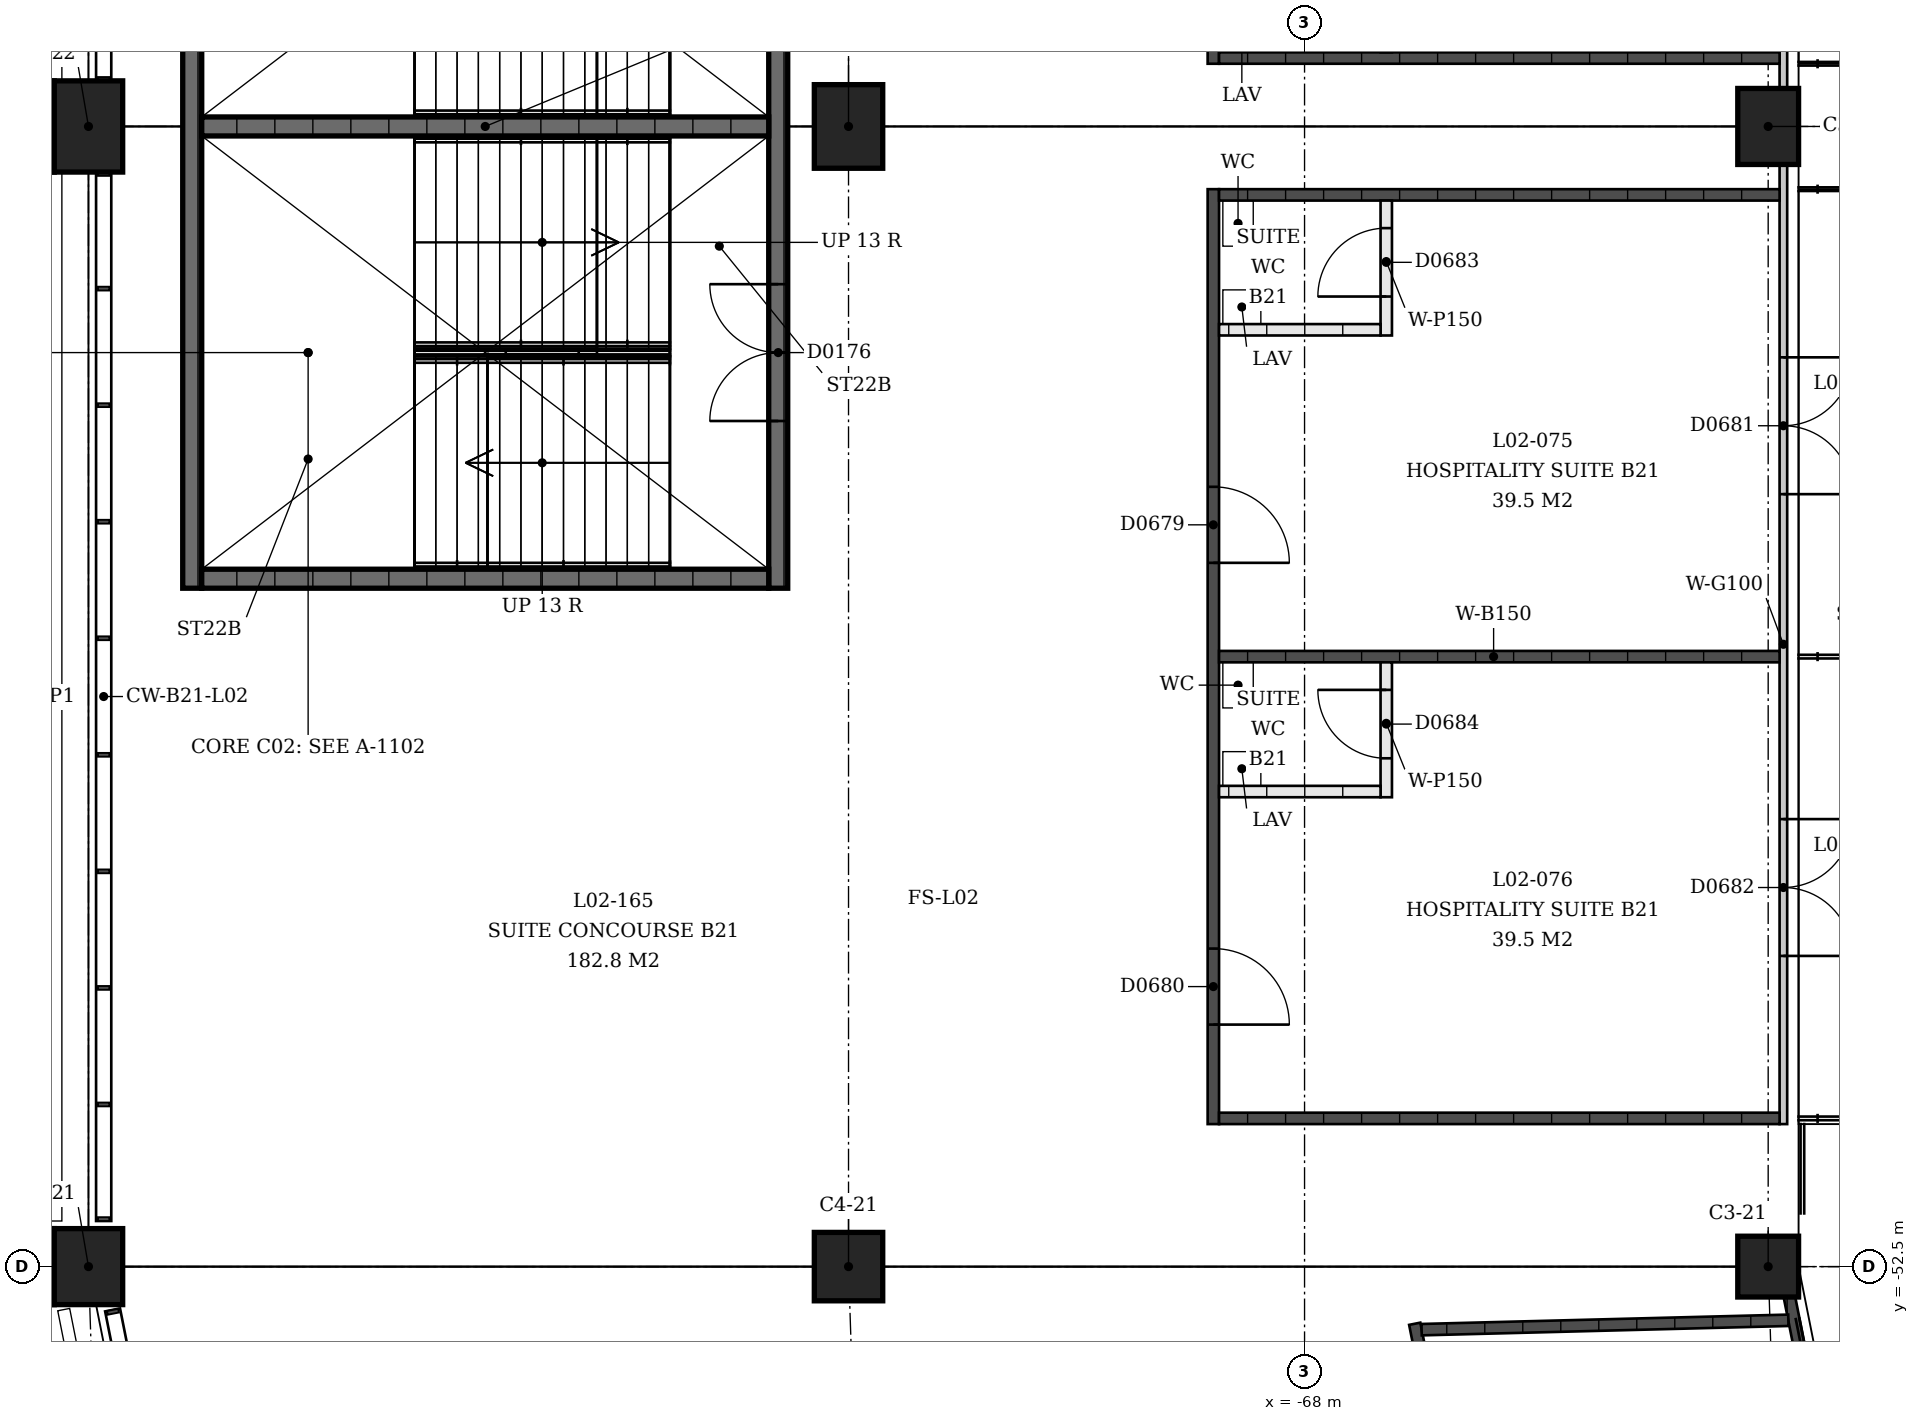
"""IFC4 building model, lengths in metres.
Left out: names, types, materials, properties, quantities, classifications, styles, units other than length and angle.
Written with IfcOpenShell. Run it as: python <this file> out.ifc"""

import sys

from ifc_helpers import new_model, si_unit, direction, frame, frame_2d, origin, origin_2d, place, context, subcontext, project, spatial, rectangle, extrude, element, fill, save


model = new_model("IFC4")
c1 = context("Model", 3, precision=1e-05, world=origin(), true_north=direction((0.0, 1.0)))
c2 = subcontext(c1, "Body", "Model", "MODEL_VIEW")
j1 = project(units=[si_unit("LENGTHUNIT", "METRE"), si_unit("PLANEANGLEUNIT", "RADIAN")], contexts=[c1])
p1 = place(None, origin())
s1 = spatial("IfcSite", under=j1, at=p1, CompositionType="ELEMENT")
p2 = place(p1, origin())
s2 = spatial("IfcBuilding", under=s1, at=p2, CompositionType="ELEMENT")
p3 = place(p2, frame((0.0, 0.0, 9.0)))
s3 = spatial("IfcBuildingStorey", under=s2, at=p3, CompositionType="ELEMENT", Elevation=9.0)
p4 = place(p3, frame((-61.9, -52.5, 0.0), z_axis=(0.0, 0.0, 1.0), x_axis=(0.0, -1.0, 0.0)))
e1 = element("IfcColumn", 1, at=p4, inside=s3, PredefinedType="COLUMN", context=c2, shape_type="SweptSolid", body=[
    extrude(rectangle(XDim=0.8, YDim=0.8, at=origin_2d()), origin(), (0.0, 0.0, 1.0), 4.5),
])
p5 = place(p3, frame((-74.0, -52.5, 0.0), z_axis=(0.0, 0.0, 1.0), x_axis=(0.0, -1.0, 0.0)))
e2 = element("IfcColumn", 2, at=p5, inside=s3, PredefinedType="COLUMN", context=c2, shape_type="SweptSolid", body=[
    extrude(rectangle(XDim=0.9, YDim=0.9, at=origin_2d()), origin(), (0.0, 0.0, 1.0), 4.5),
])
p6 = place(p3, frame((-84.0, -52.5, 0.0), z_axis=(0.0, 0.0, 1.0), x_axis=(0.0, -1.0, 0.0)))
e3 = element("IfcColumn", 3, at=p6, inside=s3, PredefinedType="COLUMN", context=c2, shape_type="SweptSolid", body=[
    extrude(rectangle(XDim=1.0, YDim=0.9, at=origin_2d()), origin(), (0.0, 0.0, 1.0), 4.5),
])
p7 = place(p3, frame((-61.9, -37.5, 0.0), z_axis=(0.0, 0.0, 1.0), x_axis=(0.0, -1.0, 0.0)))
e4 = element("IfcColumn", 4, at=p7, inside=s3, PredefinedType="COLUMN", context=c2, shape_type="SweptSolid", body=[
    extrude(rectangle(XDim=1.0, YDim=0.8, at=origin_2d()), origin(), (0.0, 0.0, 1.0), 4.5),
])
p8 = place(p3, frame((-74.0, -37.5, 0.0), z_axis=(0.0, 0.0, 1.0), x_axis=(0.0, -1.0, 0.0)))
e5 = element("IfcColumn", 5, at=p8, inside=s3, PredefinedType="COLUMN", context=c2, shape_type="SweptSolid", body=[
    extrude(rectangle(XDim=1.1, YDim=0.9, at=origin_2d()), origin(), (0.0, 0.0, 1.0), 4.5),
])
p9 = place(p3, frame((-84.0, -37.5, 0.0), z_axis=(0.0, 0.0, 1.0), x_axis=(0.0, -1.0, 0.0)))
e6 = element("IfcColumn", 6, at=p9, inside=s3, PredefinedType="COLUMN", context=c2, shape_type="SweptSolid", body=[
    extrude(rectangle(XDim=1.2, YDim=0.9, at=origin_2d()), origin(), (0.0, 0.0, 1.0), 4.5),
])
p10 = place(p3, frame((-74.925, -31.425, 0.0), z_axis=(0.0, 0.0, 1.0), x_axis=(0.0, -1.0, 0.0)))
e7 = element("IfcWall", 7, at=p10, inside=s3, PredefinedType="SHEAR", context=c2, shape_type="SweptSolid", body=[
    extrude(rectangle(XDim=12.15, YDim=0.25, at=frame_2d((6.075, 0.0))), origin(), (0.0, 0.0, 1.0), 4.09),
])
p11 = place(p10, frame((2.2, 0.0, 0.0)))
e8 = element("IfcOpeningElement", 8, at=p11, cuts=e7, PredefinedType="OPENING", context=c2, shape_type="SweptSolid", body=[
    extrude(rectangle(XDim=1.8, YDim=2.1, at=frame_2d((0.9, 1.05))), frame((0.0, 0.125, 0.0), z_axis=(0.0, -1.0, 0.0), x_axis=(1.0, 0.0, 0.0)), (0.0, 0.0, 1.0), 0.25),
])
p12 = place(p10, frame((8.15, 0.0, 0.0)))
e9 = element("IfcOpeningElement", 9, at=p12, cuts=e7, PredefinedType="OPENING", context=c2, shape_type="SweptSolid", body=[
    extrude(rectangle(XDim=1.8, YDim=2.1, at=frame_2d((0.9, 1.05))), frame((0.0, 0.125, 0.0), z_axis=(0.0, -1.0, 0.0), x_axis=(1.0, 0.0, 0.0)), (0.0, 0.0, 1.0), 0.25),
])
p13 = place(p3, frame((-82.635, -31.425, 0.0), z_axis=(0.0, 0.0, 1.0), x_axis=(0.0, -1.0, 0.0)))
e10 = element("IfcWall", 10, at=p13, inside=s3, PredefinedType="SHEAR", context=c2, shape_type="SweptSolid", body=[
    extrude(rectangle(XDim=12.15, YDim=0.25, at=frame_2d((6.075, 0.0))), origin(), (0.0, 0.0, 1.0), 4.09),
])
for number, where, z_axis, x_axis in (
    (11, (-75.05, -43.45, 0.0), (0.0, 0.0, 1.0), (-1.0, 0.0, 0.0)),
    (12, (-75.05, -37.5, 0.0), (0.0, 0.0, 1.0), (-1.0, 0.0, 0.0)),
):
    element("IfcWall", number, at=place(p3, frame(where, z_axis=z_axis, x_axis=x_axis)), inside=s3, PredefinedType="SHEAR", context=c2, shape_type="SweptSolid", body=[
        extrude(rectangle(XDim=7.46, YDim=0.25, at=frame_2d((3.73, 0.0))), origin(), (0.0, 0.0, 1.0), 4.09),
    ])
p14 = place(p3, frame((-59.681, -62.65, 0.0), z_axis=(0.0, 0.0, 1.0), x_axis=(-0.195086492048, 0.980786042223, 0.0)))
e13 = element("IfcWall", 13, at=p14, inside=s3, PredefinedType="SOLIDWALL", context=c2, shape_type="SweptSolid", body=[
    extrude(rectangle(XDim=9.941, YDim=0.15, at=frame_2d((4.971, 0.0))), origin(), (0.0, 0.0, 1.0), 3.0),
])
p15 = place(p3, frame((-64.385, -64.138, 0.0), z_axis=(0.0, 0.0, 1.0), x_axis=(-0.195083899224, 0.980786557954, 0.0)))
e14 = element("IfcWall", 14, at=p15, inside=s3, PredefinedType="SOLIDWALL", context=c2, shape_type="SweptSolid", body=[
    extrude(rectangle(XDim=11.099, YDim=0.15, at=frame_2d((5.55, 0.0))), origin(), (0.0, 0.0, 1.0), 3.0),
])
p16 = place(p15, frame((2.315, 0.0, 0.0)))
e15 = element("IfcOpeningElement", 15, at=p16, cuts=e14, PredefinedType="OPENING", context=c2, shape_type="SweptSolid", body=[
    extrude(rectangle(XDim=1.0, YDim=2.1, at=frame_2d((0.5, 1.05))), frame((0.0, 0.075, 0.0), z_axis=(0.0, -1.0, 0.0), x_axis=(1.0, 0.0, 0.0)), (0.0, 0.0, 1.0), 0.15),
])
p17 = place(p15, frame((7.784, 0.0, 0.0)))
e16 = element("IfcOpeningElement", 16, at=p17, cuts=e14, PredefinedType="OPENING", context=c2, shape_type="SweptSolid", body=[
    extrude(rectangle(XDim=1.0, YDim=2.1, at=frame_2d((0.5, 1.05))), frame((0.0, 0.075, 0.0), z_axis=(0.0, -1.0, 0.0), x_axis=(1.0, 0.0, 0.0)), (0.0, 0.0, 1.0), 0.15),
])
p18 = place(p3, frame((-61.635, -53.206, 0.0), z_axis=(0.0, 0.0, 1.0), x_axis=(-0.999673752981, -0.025541879345, 0.0)))
e17 = element("IfcWall", 17, at=p18, inside=s3, PredefinedType="SOLIDWALL", context=c2, shape_type="SweptSolid", body=[
    extrude(rectangle(XDim=4.827, YDim=0.15, at=frame_2d((2.414, 0.0))), origin(), (0.0, 0.0, 1.0), 3.0),
])
p19 = place(p3, frame((-61.7, -38.0, 0.0), z_axis=(0.0, 0.0, 1.0), x_axis=(0.0, -1.0, 0.0)))
e18 = element("IfcWall", 18, at=p19, inside=s3, PredefinedType="PARTITIONING", context=c2, shape_type="SweptSolid", body=[
    extrude(rectangle(XDim=12.625, YDim=0.1, at=frame_2d((6.312, 0.0))), origin(), (0.0, 0.0, 1.0), 3.0),
])
p20 = place(p19, frame((2.538, 0.0, 0.0)))
e19 = element("IfcOpeningElement", 19, at=p20, cuts=e18, PredefinedType="OPENING", context=c2, shape_type="SweptSolid", body=[
    extrude(rectangle(XDim=1.8, YDim=2.1, at=frame_2d((0.9, 1.05))), frame((0.0, 0.05, 0.0), z_axis=(0.0, -1.0, 0.0), x_axis=(1.0, 0.0, 0.0)), (0.0, 0.0, 1.0), 0.1),
])
p21 = place(p19, frame((8.613, 0.0, 0.0)))
e20 = element("IfcOpeningElement", 20, at=p21, cuts=e18, PredefinedType="OPENING", context=c2, shape_type="SweptSolid", body=[
    extrude(rectangle(XDim=1.8, YDim=2.1, at=frame_2d((0.9, 1.05))), frame((0.0, 0.05, 0.0), z_axis=(0.0, -1.0, 0.0), x_axis=(1.0, 0.0, 0.0)), (0.0, 0.0, 1.0), 0.1),
])
p22 = place(p3, frame((-69.2, -38.325, 0.0), z_axis=(0.0, 0.0, 1.0), x_axis=(0.0, -1.0, 0.0)))
e21 = element("IfcWall", 21, at=p22, inside=s3, PredefinedType="SOLIDWALL", context=c2, shape_type="SweptSolid", body=[
    extrude(rectangle(XDim=12.3, YDim=0.15, at=frame_2d((6.15, 0.0))), origin(), (0.0, 0.0, 1.0), 3.0),
])
p23 = place(p22, frame((3.916, 0.0, 0.0)))
e22 = element("IfcOpeningElement", 22, at=p23, cuts=e21, PredefinedType="OPENING", context=c2, shape_type="SweptSolid", body=[
    extrude(rectangle(XDim=1.0, YDim=2.1, at=frame_2d((0.5, 1.05))), frame((0.0, 0.075, 0.0), z_axis=(0.0, -1.0, 0.0), x_axis=(1.0, 0.0, 0.0)), (0.0, 0.0, 1.0), 0.15),
])
p24 = place(p22, frame((9.991, 0.0, 0.0)))
e23 = element("IfcOpeningElement", 23, at=p24, cuts=e21, PredefinedType="OPENING", context=c2, shape_type="SweptSolid", body=[
    extrude(rectangle(XDim=1.0, YDim=2.1, at=frame_2d((0.5, 1.05))), frame((0.0, 0.075, 0.0), z_axis=(0.0, -1.0, 0.0), x_axis=(1.0, 0.0, 0.0)), (0.0, 0.0, 1.0), 0.15),
])
for number, where, z_axis, x_axis in (
    (24, (-61.75, -38.4, 0.0), (0.0, 0.0, 1.0), (-1.0, 0.0, 0.0)),
    (25, (-61.75, -44.475, 0.0), (0.0, 0.0, 1.0), (-1.0, 0.0, 0.0)),
    (26, (-61.75, -50.55, 0.0), (0.0, 0.0, 1.0), (-1.0, 0.0, 0.0)),
):
    element("IfcWall", number, at=place(p3, frame(where, z_axis=z_axis, x_axis=x_axis)), inside=s3, PredefinedType="SOLIDWALL", context=c2, shape_type="SweptSolid", body=[
        extrude(rectangle(XDim=7.375, YDim=0.15, at=frame_2d((3.688, 0.0))), origin(), (0.0, 0.0, 1.0), 3.0),
    ])
p25 = place(p3, frame((-66.925, -38.475, 0.0), z_axis=(0.0, 0.0, 1.0), x_axis=(0.0, -1.0, 0.0)))
e27 = element("IfcWall", 27, at=p25, inside=s3, PredefinedType="PARTITIONING", context=c2, shape_type="SweptSolid", body=[
    extrude(rectangle(XDim=1.775, YDim=0.15, at=frame_2d((0.887, 0.0))), origin(), (0.0, 0.0, 1.0), 3.0),
])
p26 = place(p25, frame((0.363, 0.0, 0.0)))
e28 = element("IfcOpeningElement", 28, at=p26, cuts=e27, PredefinedType="OPENING", context=c2, shape_type="SweptSolid", body=[
    extrude(rectangle(XDim=0.9, YDim=2.1, at=frame_2d((0.45, 1.05))), frame((0.0, 0.075, 0.0), z_axis=(0.0, -1.0, 0.0), x_axis=(1.0, 0.0, 0.0)), (0.0, 0.0, 1.0), 0.15),
])
p27 = place(p3, frame((-67.0, -40.175, 0.0), z_axis=(0.0, 0.0, 1.0), x_axis=(-1.0, 0.0, 0.0)))
e29 = element("IfcWall", 29, at=p27, inside=s3, PredefinedType="PARTITIONING", context=c2, shape_type="SweptSolid", body=[
    extrude(rectangle(XDim=2.125, YDim=0.15, at=frame_2d((1.062, 0.0))), origin(), (0.0, 0.0, 1.0), 3.0),
])
p28 = place(p3, frame((-66.925, -44.55, 0.0), z_axis=(0.0, 0.0, 1.0), x_axis=(0.0, -1.0, 0.0)))
e30 = element("IfcWall", 30, at=p28, inside=s3, PredefinedType="PARTITIONING", context=c2, shape_type="SweptSolid", body=[
    extrude(rectangle(XDim=1.775, YDim=0.15, at=frame_2d((0.887, 0.0))), origin(), (0.0, 0.0, 1.0), 3.0),
])
p29 = place(p28, frame((0.363, 0.0, 0.0)))
e31 = element("IfcOpeningElement", 31, at=p29, cuts=e30, PredefinedType="OPENING", context=c2, shape_type="SweptSolid", body=[
    extrude(rectangle(XDim=0.9, YDim=2.1, at=frame_2d((0.45, 1.05))), frame((0.0, 0.075, 0.0), z_axis=(0.0, -1.0, 0.0), x_axis=(1.0, 0.0, 0.0)), (0.0, 0.0, 1.0), 0.15),
])
p30 = place(p3, frame((-67.0, -46.25, 0.0), z_axis=(0.0, 0.0, 1.0), x_axis=(-1.0, 0.0, 0.0)))
e32 = element("IfcWall", 32, at=p30, inside=s3, PredefinedType="PARTITIONING", context=c2, shape_type="SweptSolid", body=[
    extrude(rectangle(XDim=2.125, YDim=0.15, at=frame_2d((1.062, 0.0))), origin(), (0.0, 0.0, 1.0), 3.0),
])
p31 = place(p3, frame((-61.7, -37.0, 0.0), z_axis=(0.0, 0.0, 1.0), x_axis=(0.0, 1.0, 0.0)))
e33 = element("IfcWall", 33, at=p31, inside=s3, PredefinedType="PARTITIONING", context=c2, shape_type="SweptSolid", body=[
    extrude(rectangle(XDim=12.625, YDim=0.1, at=frame_2d((6.312, 0.0))), origin(), (0.0, 0.0, 1.0), 3.0),
])
p32 = place(p31, frame((2.538, 0.0, 0.0)))
e34 = element("IfcOpeningElement", 34, at=p32, cuts=e33, PredefinedType="OPENING", context=c2, shape_type="SweptSolid", body=[
    extrude(rectangle(XDim=1.8, YDim=2.1, at=frame_2d((0.9, 1.05))), frame((0.0, 0.05, 0.0), z_axis=(0.0, -1.0, 0.0), x_axis=(1.0, 0.0, 0.0)), (0.0, 0.0, 1.0), 0.1),
])
p33 = place(p31, frame((8.613, 0.0, 0.0)))
e35 = element("IfcOpeningElement", 35, at=p33, cuts=e33, PredefinedType="OPENING", context=c2, shape_type="SweptSolid", body=[
    extrude(rectangle(XDim=1.8, YDim=2.1, at=frame_2d((0.9, 1.05))), frame((0.0, 0.05, 0.0), z_axis=(0.0, -1.0, 0.0), x_axis=(1.0, 0.0, 0.0)), (0.0, 0.0, 1.0), 0.1),
])
p34 = place(p3, frame((-69.2, -36.675, 0.0), z_axis=(0.0, 0.0, 1.0), x_axis=(0.0, 1.0, 0.0)))
e36 = element("IfcWall", 36, at=p34, inside=s3, PredefinedType="SOLIDWALL", context=c2, shape_type="SweptSolid", body=[
    extrude(rectangle(XDim=12.3, YDim=0.15, at=frame_2d((6.15, 0.0))), origin(), (0.0, 0.0, 1.0), 3.0),
])
p35 = place(p34, frame((3.916, 0.0, 0.0)))
e37 = element("IfcOpeningElement", 37, at=p35, cuts=e36, PredefinedType="OPENING", context=c2, shape_type="SweptSolid", body=[
    extrude(rectangle(XDim=1.0, YDim=2.1, at=frame_2d((0.5, 1.05))), frame((0.0, 0.075, 0.0), z_axis=(0.0, -1.0, 0.0), x_axis=(1.0, 0.0, 0.0)), (0.0, 0.0, 1.0), 0.15),
])
p36 = place(p34, frame((9.991, 0.0, 0.0)))
e38 = element("IfcOpeningElement", 38, at=p36, cuts=e36, PredefinedType="OPENING", context=c2, shape_type="SweptSolid", body=[
    extrude(rectangle(XDim=1.0, YDim=2.1, at=frame_2d((0.5, 1.05))), frame((0.0, 0.075, 0.0), z_axis=(0.0, -1.0, 0.0), x_axis=(1.0, 0.0, 0.0)), (0.0, 0.0, 1.0), 0.15),
])
p37 = place(p3, frame((-61.75, -36.6, 0.0), z_axis=(0.0, 0.0, 1.0), x_axis=(-1.0, 0.0, 0.0)))
e39 = element("IfcWall", 39, at=p37, inside=s3, PredefinedType="SOLIDWALL", context=c2, shape_type="SweptSolid", body=[
    extrude(rectangle(XDim=7.375, YDim=0.15, at=frame_2d((3.688, 0.0))), origin(), (0.0, 0.0, 1.0), 3.0),
])
p38 = place(p3, frame((-66.925, -36.525, 0.0), z_axis=(0.0, 0.0, 1.0), x_axis=(0.0, 1.0, 0.0)))
e40 = element("IfcWall", 40, at=p38, inside=s3, PredefinedType="PARTITIONING", context=c2, shape_type="SweptSolid", body=[
    extrude(rectangle(XDim=1.775, YDim=0.15, at=frame_2d((0.887, 0.0))), origin(), (0.0, 0.0, 1.0), 3.0),
])
p39 = place(p38, frame((0.363, 0.0, 0.0)))
e41 = element("IfcOpeningElement", 41, at=p39, cuts=e40, PredefinedType="OPENING", context=c2, shape_type="SweptSolid", body=[
    extrude(rectangle(XDim=0.9, YDim=2.1, at=frame_2d((0.45, 1.05))), frame((0.0, 0.075, 0.0), z_axis=(0.0, -1.0, 0.0), x_axis=(1.0, 0.0, 0.0)), (0.0, 0.0, 1.0), 0.15),
])
p40 = place(p12, origin())
e42 = element("IfcDoor", 42, at=p40, inside=s3, OperationType="DOUBLE_DOOR_SINGLE_SWING", PredefinedType="DOOR", context=c2, shape_type="SweptSolid", body=[
    extrude(rectangle(XDim=1.8, YDim=2.1, at=frame_2d((0.9, 1.05))), frame((0.0, 0.025, 0.0), z_axis=(0.0, -1.0, 0.0), x_axis=(1.0, 0.0, 0.0)), (0.0, 0.0, 1.0), 0.05),
])
fill(e9, e42)
p41 = place(p23, origin())
e43 = element("IfcDoor", 43, at=p41, inside=s3, OperationType="SINGLE_SWING_LEFT", PredefinedType="DOOR", context=c2, shape_type="SweptSolid", body=[
    extrude(rectangle(XDim=1.0, YDim=2.1, at=frame_2d((0.5, 1.05))), frame((0.0, 0.025, 0.0), z_axis=(0.0, -1.0, 0.0), x_axis=(1.0, 0.0, 0.0)), (0.0, 0.0, 1.0), 0.05),
])
fill(e22, e43)
p42 = place(p24, origin())
e44 = element("IfcDoor", 44, at=p42, inside=s3, OperationType="SINGLE_SWING_LEFT", PredefinedType="DOOR", context=c2, shape_type="SweptSolid", body=[
    extrude(rectangle(XDim=1.0, YDim=2.1, at=frame_2d((0.5, 1.05))), frame((0.0, 0.025, 0.0), z_axis=(0.0, -1.0, 0.0), x_axis=(1.0, 0.0, 0.0)), (0.0, 0.0, 1.0), 0.05),
])
fill(e23, e44)
p43 = place(p20, origin())
e45 = element("IfcDoor", 45, at=p43, inside=s3, OperationType="DOUBLE_DOOR_SINGLE_SWING", PredefinedType="DOOR", context=c2, shape_type="SweptSolid", body=[
    extrude(rectangle(XDim=1.8, YDim=2.1, at=frame_2d((0.9, 1.05))), frame((0.0, 0.025, 0.0), z_axis=(0.0, -1.0, 0.0), x_axis=(1.0, 0.0, 0.0)), (0.0, 0.0, 1.0), 0.05),
])
fill(e19, e45)
p44 = place(p21, origin())
e46 = element("IfcDoor", 46, at=p44, inside=s3, OperationType="DOUBLE_DOOR_SINGLE_SWING", PredefinedType="DOOR", context=c2, shape_type="SweptSolid", body=[
    extrude(rectangle(XDim=1.8, YDim=2.1, at=frame_2d((0.9, 1.05))), frame((0.0, 0.025, 0.0), z_axis=(0.0, -1.0, 0.0), x_axis=(1.0, 0.0, 0.0)), (0.0, 0.0, 1.0), 0.05),
])
fill(e20, e46)
p45 = place(p26, origin())
e47 = element("IfcDoor", 47, at=p45, inside=s3, OperationType="SINGLE_SWING_RIGHT", PredefinedType="DOOR", context=c2, shape_type="SweptSolid", body=[
    extrude(rectangle(XDim=0.9, YDim=2.1, at=frame_2d((0.45, 1.05))), frame((0.0, 0.025, 0.0), z_axis=(0.0, -1.0, 0.0), x_axis=(1.0, 0.0, 0.0)), (0.0, 0.0, 1.0), 0.05),
])
fill(e28, e47)
p46 = place(p29, origin())
e48 = element("IfcDoor", 48, at=p46, inside=s3, OperationType="SINGLE_SWING_LEFT", PredefinedType="DOOR", context=c2, shape_type="SweptSolid", body=[
    extrude(rectangle(XDim=0.9, YDim=2.1, at=frame_2d((0.45, 1.05))), frame((0.0, 0.025, 0.0), z_axis=(0.0, -1.0, 0.0), x_axis=(1.0, 0.0, 0.0)), (0.0, 0.0, 1.0), 0.05),
])
fill(e31, e48)
save(model, sys.argv[1])
